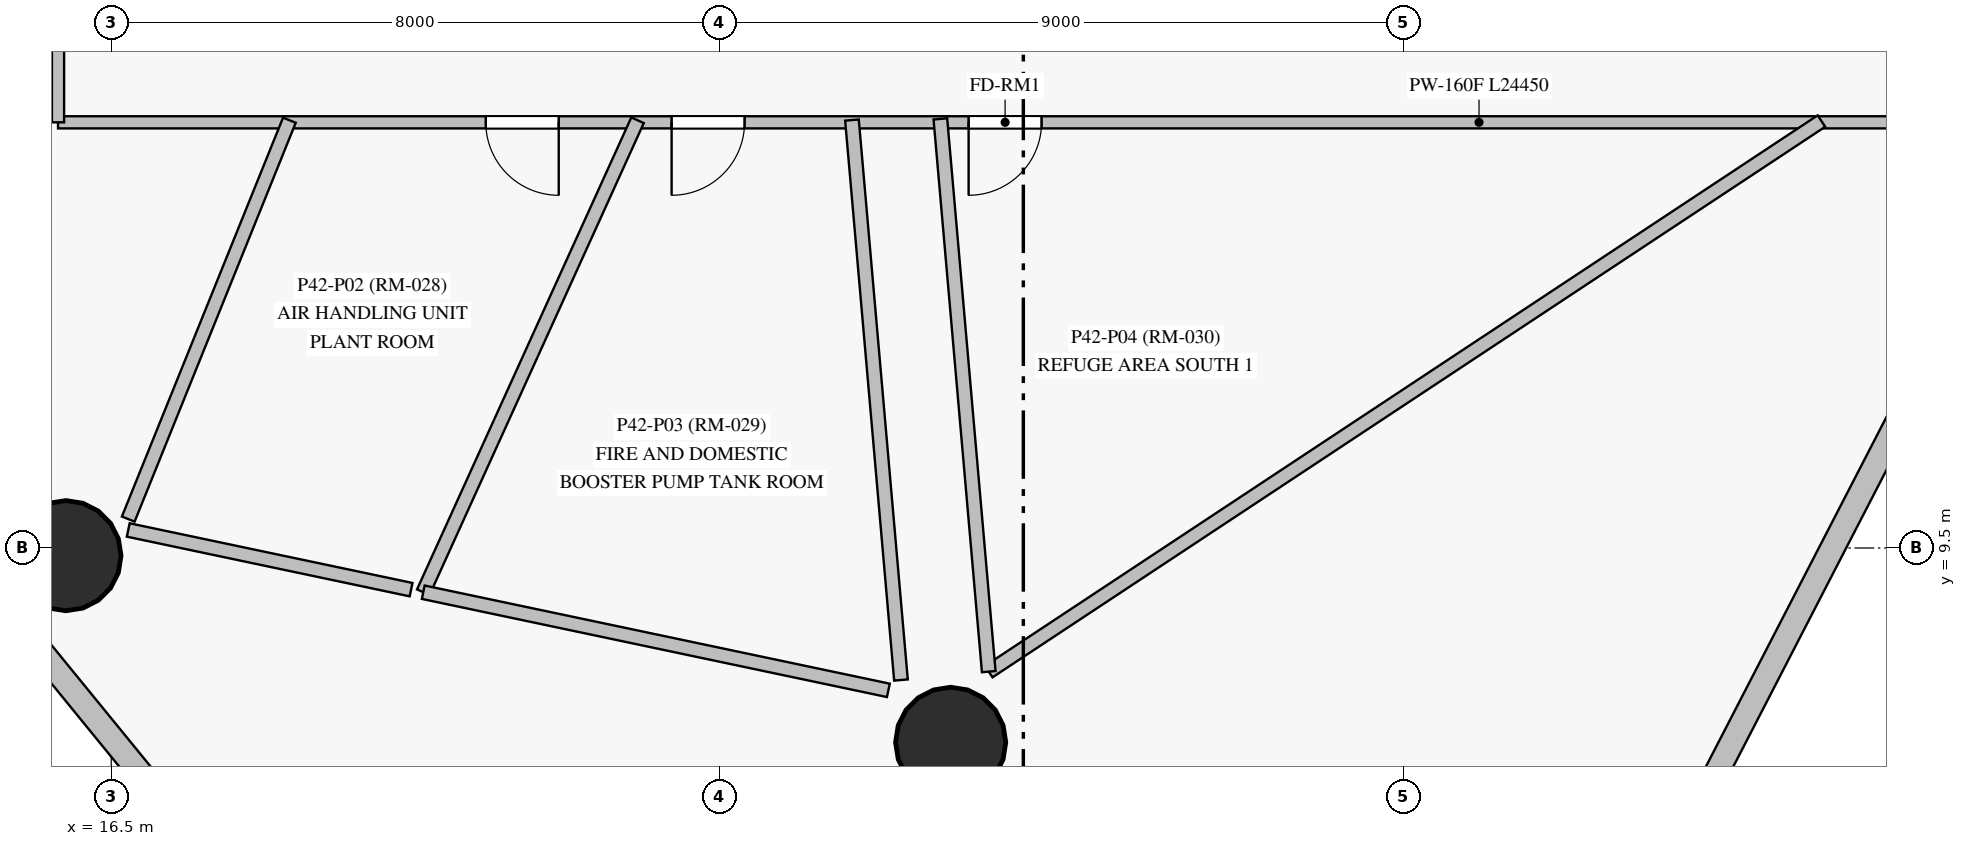
"""IFC4 building model, lengths in metres.
Left out: names, types, materials, properties, quantities, classifications, styles, units other than length and angle.
Written with IfcOpenShell. Run it as: python <this file> out.ifc"""

import sys

from ifc_helpers import new_model, si_unit, direction, frame, frame_2d, origin, origin_with_axes, origin_2d, place, context, subcontext, project, spatial, rectangle, circle, extrude, source, transform, mapped, element, fill, save


model = new_model("IFC4")
c1 = context("Model", 3, precision=1e-05, world=origin(), true_north=direction((0.0, 1.0)))
c2 = subcontext(c1, "Body", "Model", "MODEL_VIEW")
j1 = project(units=[si_unit("LENGTHUNIT", "METRE"), si_unit("PLANEANGLEUNIT", "RADIAN")], contexts=[c1])
p1 = place(None, origin())
s1 = spatial("IfcSite", under=j1, at=p1, CompositionType="ELEMENT")
p2 = place(p1, origin())
s2 = spatial("IfcBuilding", under=s1, at=p2, CompositionType="ELEMENT")
p3 = place(p2, frame((0.0, 0.0, 148.05)))
s3 = spatial("IfcBuildingStorey", under=s2, at=p3, CompositionType="ELEMENT", Elevation=148.05)
m1 = source(origin_with_axes(), c2, "Body", "SweptSolid", [
    extrude(circle(Radius=0.725, at=origin_2d()), origin(), (0.0, 0.0, 1.0), 4.5),
])
for number, where, z_axis, x_axis in (
    (1, (15.904, 9.399, 0.0), (0.0, 0.0, 1.0), (1.0, 0.0, 0.0)),
    (2, (27.544, 6.943, 0.0), (0.0, 0.0, 1.0), (1.0, 0.0, 0.0)),
):
    element("IfcColumn", number, at=place(p3, frame(where, z_axis=z_axis, x_axis=x_axis)), inside=s3, PredefinedType="COLUMN", context=c2, shape_type="MappedRepresentation", body=[
        mapped(m1, transform((0.0, 0.0, 0.0), scale=1.0)),
    ])
p4 = place(p3, frame((11.274, 13.411, 0.0), z_axis=(0.0, 0.0, 1.0), x_axis=(0.632242798303, -0.774770316929, 0.0)))
e3 = element("IfcWall", 3, at=p4, inside=s3, PredefinedType="SOLIDWALL", context=c2, shape_type="SweptSolid", body=[
    extrude(rectangle(XDim=9.372, YDim=0.32, at=frame_2d((4.686, 0.0))), origin(), (0.0, 0.0, 1.0), 4.275),
])
p5 = place(p3, frame((36.852, 5.058, 0.0), z_axis=(0.0, 0.0, 1.0), x_axis=(0.458837160791, 0.888520376737, 0.0)))
e4 = element("IfcWall", 4, at=p5, inside=s3, PredefinedType="SOLIDWALL", context=c2, shape_type="SweptSolid", body=[
    extrude(rectangle(XDim=13.926, YDim=0.32, at=frame_2d((6.963, 0.0))), origin(), (0.0, 0.0, 1.0), 4.275),
])
p6 = place(p3, frame((40.25, 15.1, 0.0), z_axis=(0.0, 0.0, 1.0), x_axis=(-1.0, 0.0, 0.0)))
e5 = element("IfcWall", 5, at=p6, inside=s3, PredefinedType="PARTITIONING", context=c2, shape_type="SweptSolid", body=[
    extrude(rectangle(XDim=24.45, YDim=0.16, at=frame_2d((12.225, 0.0))), origin(), (0.0, 0.0, 1.0), 2.875),
])
p7 = place(p6, frame((11.51, 0.0, 0.0)))
e6 = element("IfcOpeningElement", 6, at=p7, cuts=e5, PredefinedType="OPENING", context=c2, shape_type="SweptSolid", body=[
    extrude(rectangle(XDim=0.96, YDim=2.15, at=frame_2d((0.48, 1.075))), frame((0.0, 0.09, 0.0), z_axis=(0.0, -1.0, 0.0), x_axis=(1.0, 0.0, 0.0)), (0.0, 0.0, 1.0), 0.18),
])
p8 = place(p6, frame((17.863, 0.0, 0.0)))
e7 = element("IfcOpeningElement", 7, at=p8, cuts=e5, PredefinedType="OPENING", context=c2, shape_type="SweptSolid", body=[
    extrude(rectangle(XDim=0.96, YDim=2.15, at=frame_2d((0.48, 1.075))), frame((0.0, 0.09, 0.0), z_axis=(0.0, -1.0, 0.0), x_axis=(1.0, 0.0, 0.0)), (0.0, 0.0, 1.0), 0.18),
])
p9 = place(p6, frame((15.417, 0.0, 0.0)))
e8 = element("IfcOpeningElement", 8, at=p9, cuts=e5, PredefinedType="OPENING", context=c2, shape_type="SweptSolid", body=[
    extrude(rectangle(XDim=0.96, YDim=2.15, at=frame_2d((0.48, 1.075))), frame((0.0, 0.09, 0.0), z_axis=(0.0, -1.0, 0.0), x_axis=(1.0, 0.0, 0.0)), (0.0, 0.0, 1.0), 0.18),
])
p10 = place(p3, frame((15.8, 15.1, 0.0), z_axis=(0.0, 0.0, 1.0), x_axis=(0.0, 1.0, 0.0)))
e9 = element("IfcWall", 9, at=p10, inside=s3, PredefinedType="PARTITIONING", context=c2, shape_type="SweptSolid", body=[
    extrude(rectangle(XDim=23.0, YDim=0.16, at=frame_2d((11.5, 0.0))), origin(), (0.0, 0.0, 1.0), 2.875),
])
p11 = place(p10, frame((11.025, 0.0, 0.0)))
e10 = element("IfcOpeningElement", 10, at=p11, cuts=e9, PredefinedType="OPENING", context=c2, shape_type="SweptSolid", body=[
    extrude(rectangle(XDim=0.96, YDim=2.15, at=frame_2d((0.48, 1.075))), frame((0.0, 0.09, 0.0), z_axis=(0.0, -1.0, 0.0), x_axis=(1.0, 0.0, 0.0)), (0.0, 0.0, 1.0), 0.18),
])
p12 = place(p3, frame((39.0, 15.116, 0.0), z_axis=(0.0, 0.0, 1.0), x_axis=(-0.834163511117, -0.551517213441, 0.0)))
e11 = element("IfcWall", 11, at=p12, inside=s3, PredefinedType="PARTITIONING", context=c2, shape_type="SweptSolid", body=[
    extrude(rectangle(XDim=13.133, YDim=0.18, at=frame_2d((6.566, 0.0))), origin(), (0.0, 0.0, 1.0), 3.375),
])
p13 = place(p3, frame((26.245, 15.13, 0.0), z_axis=(0.0, 0.0, 1.0), x_axis=(0.0871894748, -0.996191746344, 0.0)))
e12 = element("IfcWall", 12, at=p13, inside=s3, PredefinedType="PARTITIONING", context=c2, shape_type="SweptSolid", body=[
    extrude(rectangle(XDim=7.395, YDim=0.18, at=frame_2d((3.698, 0.0))), origin(), (0.0, 0.0, 1.0), 2.775),
])
p14 = place(p3, frame((28.045, 7.874, 0.0), z_axis=(0.0, 0.0, 1.0), x_axis=(-0.087199729468, 0.996190848774, 0.0)))
e13 = element("IfcWall", 13, at=p14, inside=s3, PredefinedType="PARTITIONING", context=c2, shape_type="SweptSolid", body=[
    extrude(rectangle(XDim=7.299, YDim=0.18, at=frame_2d((3.649, 0.0))), origin(), (0.0, 0.0, 1.0), 2.775),
])
p15 = place(p3, frame((20.605, 8.918, 0.0), z_axis=(0.0, 0.0, 1.0), x_axis=(0.413417166683, 0.910541732318, 0.0)))
e14 = element("IfcWall", 14, at=p15, inside=s3, PredefinedType="PARTITIONING", context=c2, shape_type="SweptSolid", body=[
    extrude(rectangle(XDim=6.819, YDim=0.18, at=frame_2d((3.41, 0.0))), origin(), (0.0, 0.0, 1.0), 4.275),
])
p16 = place(p3, frame((26.724, 7.627, 0.0), z_axis=(0.0, 0.0, 1.0), x_axis=(-0.978450674913, 0.206480693437, 0.0)))
e15 = element("IfcWall", 15, at=p16, inside=s3, PredefinedType="PARTITIONING", context=c2, shape_type="SweptSolid", body=[
    extrude(rectangle(XDim=6.254, YDim=0.18, at=frame_2d((3.127, 0.0))), origin(), (0.0, 0.0, 1.0), 2.875),
])
p17 = place(p3, frame((16.724, 9.88, 0.0), z_axis=(0.0, 0.0, 1.0), x_axis=(0.374579310396, 0.927194877155, 0.0)))
e16 = element("IfcWall", 16, at=p17, inside=s3, PredefinedType="PARTITIONING", context=c2, shape_type="SweptSolid", body=[
    extrude(rectangle(XDim=5.659, YDim=0.18, at=frame_2d((2.83, 0.0))), origin(), (0.0, 0.0, 1.0), 2.775),
])
p18 = place(p3, frame((20.445, 8.952, 0.0), z_axis=(0.0, 0.0, 1.0), x_axis=(-0.978451581625, 0.206476396752, 0.0)))
e17 = element("IfcWall", 17, at=p18, inside=s3, PredefinedType="PARTITIONING", context=c2, shape_type="SweptSolid", body=[
    extrude(rectangle(XDim=3.803, YDim=0.18, at=frame_2d((1.901, 0.0))), origin(), (0.0, 0.0, 1.0), 2.875),
])
p19 = place(p3, frame((15.84, 17.01, 0.0), z_axis=(0.0, 0.0, 1.0), x_axis=(-0.882924187659, -0.469515578917, 0.0)))
e18 = element("IfcWall", 18, at=p19, inside=s3, PredefinedType="PARTITIONING", context=c2, shape_type="SweptSolid", body=[
    extrude(rectangle(XDim=3.451, YDim=0.18, at=frame_2d((1.725, 0.0))), origin(), (0.0, 0.0, 1.0), 2.775),
])
m2 = source(origin_with_axes(), c2, "Body", "SweptSolid", [
    extrude(rectangle(XDim=0.96, YDim=2.15, at=frame_2d((0.48, 1.075))), frame((0.0, 0.025, 0.0), z_axis=(0.0, -1.0, 0.0), x_axis=(1.0, 0.0, 0.0)), (0.0, 0.0, 1.0), 0.05),
])
p20 = place(p7, origin())
e19 = element("IfcDoor", 19, at=p20, inside=s3, OperationType="SINGLE_SWING_RIGHT", PredefinedType="DOOR", context=c2, shape_type="MappedRepresentation", body=[
    mapped(m2, transform((0.0, 0.0, 0.0), scale=1.0)),
])
fill(e6, e19)
p21 = place(p8, origin())
e20 = element("IfcDoor", 20, at=p21, inside=s3, OperationType="SINGLE_SWING_LEFT", PredefinedType="DOOR", context=c2, shape_type="MappedRepresentation", body=[
    mapped(m2, transform((0.0, 0.0, 0.0), scale=1.0)),
])
fill(e7, e20)
p22 = place(p9, origin())
e21 = element("IfcDoor", 21, at=p22, inside=s3, OperationType="SINGLE_SWING_RIGHT", PredefinedType="DOOR", context=c2, shape_type="MappedRepresentation", body=[
    mapped(m2, transform((0.0, 0.0, 0.0), scale=1.0)),
])
fill(e8, e21)
save(model, sys.argv[1])
